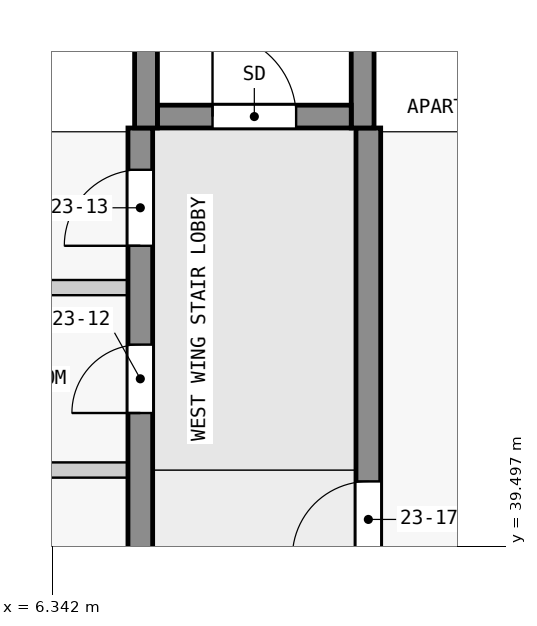
"""IFC4 building model, lengths in metres.
Left out: names, types, materials, properties, quantities, classifications, styles, units other than length and angle.
Written with IfcOpenShell. Run it as: python <this file> out.ifc"""

import sys

from ifc_helpers import new_model, si_unit, direction, frame, frame_2d, origin, place, context, subcontext, project, spatial, rectangle, extrude, element, fill, save


model = new_model("IFC4")
c1 = context("Model", 3, precision=1e-05, world=origin(), true_north=direction((0.0, 1.0)))
c2 = subcontext(c1, "Body", "Model", "MODEL_VIEW")
j1 = project(units=[si_unit("LENGTHUNIT", "METRE"), si_unit("PLANEANGLEUNIT", "RADIAN")], contexts=[c1])
p1 = place(None, origin())
s1 = spatial("IfcSite", under=j1, at=p1, CompositionType="ELEMENT")
p2 = place(p1, origin())
s2 = spatial("IfcBuilding", under=s1, at=p2, CompositionType="ELEMENT")
p3 = place(p2, frame((0.0, 0.0, 92.3)))
s3 = spatial("IfcBuildingStorey", under=s2, at=p3, CompositionType="ELEMENT", Elevation=92.3)
p4 = place(p3, frame((7.725, 45.15, 0.0), z_axis=(0.0, 0.0, 1.0), x_axis=(1.0, 0.0, 0.0)))
e1 = element("IfcWall", 1, at=p4, inside=s3, PredefinedType="SHEAR", context=c2, shape_type="SweptSolid", body=[
    extrude(rectangle(XDim=2.55, YDim=0.3, at=frame_2d((1.275, 0.0))), origin(), (0.0, 0.0, 1.0), 3.5),
])
p5 = place(p4, frame((0.725, 0.0, 0.0)))
e2 = element("IfcOpeningElement", 2, at=p5, cuts=e1, PredefinedType="OPENING", context=c2, shape_type="SweptSolid", body=[
    extrude(rectangle(XDim=1.1, YDim=2.1, at=frame_2d((0.55, 1.05))), frame((0.0, 0.16, 0.0), z_axis=(0.0, -1.0, 0.0), x_axis=(1.0, 0.0, 0.0)), (0.0, 0.0, 1.0), 0.32),
])
for number, where, z_axis, x_axis in (
    (3, (7.575, 45.0, 0.0), (0.0, 0.0, 1.0), (0.0, 1.0, 0.0)),
    (4, (10.425, 45.0, 0.0), (0.0, 0.0, 1.0), (0.0, 1.0, 0.0)),
):
    element("IfcWall", number, at=place(p3, frame(where, z_axis=z_axis, x_axis=x_axis)), inside=s3, PredefinedType="SHEAR", context=c2, shape_type="SweptSolid", body=[
        extrude(rectangle(XDim=7.2, YDim=0.3, at=frame_2d((3.6, 0.0))), origin(), (0.0, 0.0, 1.0), 3.5),
    ])
p6 = place(p3, frame((7.5, 18.0, 0.0), z_axis=(0.0, 0.0, 1.0), x_axis=(0.0, 1.0, 0.0)))
e5 = element("IfcWall", 5, at=p6, inside=s3, PredefinedType="SHEAR", context=c2, shape_type="SweptSolid", body=[
    extrude(rectangle(XDim=27.0, YDim=0.325, at=frame_2d((13.5, 0.0))), origin(), (0.0, 0.0, 1.0), 3.25),
])
p7 = place(p6, frame((1.75, 0.0, 0.0)))
e6 = element("IfcOpeningElement", 6, at=p7, cuts=e5, PredefinedType="OPENING", context=c2, shape_type="SweptSolid", body=[
    extrude(rectangle(XDim=1.0, YDim=2.1, at=frame_2d((0.5, 1.05))), frame((0.0, 0.172, 0.0), z_axis=(0.0, -1.0, 0.0), x_axis=(1.0, 0.0, 0.0)), (0.0, 0.0, 1.0), 0.345),
])
p8 = place(p6, frame((6.25, 0.0, 0.0)))
e7 = element("IfcOpeningElement", 7, at=p8, cuts=e5, PredefinedType="OPENING", context=c2, shape_type="SweptSolid", body=[
    extrude(rectangle(XDim=1.0, YDim=2.1, at=frame_2d((0.5, 1.05))), frame((0.0, 0.172, 0.0), z_axis=(0.0, -1.0, 0.0), x_axis=(1.0, 0.0, 0.0)), (0.0, 0.0, 1.0), 0.345),
])
p9 = place(p6, frame((10.85, 0.0, 0.0)))
e8 = element("IfcOpeningElement", 8, at=p9, cuts=e5, PredefinedType="OPENING", context=c2, shape_type="SweptSolid", body=[
    extrude(rectangle(XDim=0.9, YDim=2.1, at=frame_2d((0.45, 1.05))), frame((0.0, 0.172, 0.0), z_axis=(0.0, -1.0, 0.0), x_axis=(1.0, 0.0, 0.0)), (0.0, 0.0, 1.0), 0.345),
])
p10 = place(p6, frame((15.25, 0.0, 0.0)))
e9 = element("IfcOpeningElement", 9, at=p10, cuts=e5, PredefinedType="OPENING", context=c2, shape_type="SweptSolid", body=[
    extrude(rectangle(XDim=1.0, YDim=2.1, at=frame_2d((0.5, 1.05))), frame((0.0, 0.172, 0.0), z_axis=(0.0, -1.0, 0.0), x_axis=(1.0, 0.0, 0.0)), (0.0, 0.0, 1.0), 0.345),
])
p11 = place(p6, frame((19.85, 0.0, 0.0)))
e10 = element("IfcOpeningElement", 10, at=p11, cuts=e5, PredefinedType="OPENING", context=c2, shape_type="SweptSolid", body=[
    extrude(rectangle(XDim=0.9, YDim=2.1, at=frame_2d((0.45, 1.05))), frame((0.0, 0.172, 0.0), z_axis=(0.0, -1.0, 0.0), x_axis=(1.0, 0.0, 0.0)), (0.0, 0.0, 1.0), 0.345),
])
p12 = place(p6, frame((23.25, 0.0, 0.0)))
e11 = element("IfcOpeningElement", 11, at=p12, cuts=e5, PredefinedType="OPENING", context=c2, shape_type="SweptSolid", body=[
    extrude(rectangle(XDim=0.9, YDim=2.1, at=frame_2d((0.45, 1.05))), frame((0.0, 0.172, 0.0), z_axis=(0.0, -1.0, 0.0), x_axis=(1.0, 0.0, 0.0)), (0.0, 0.0, 1.0), 0.345),
])
p13 = place(p6, frame((25.45, 0.0, 0.0)))
e12 = element("IfcOpeningElement", 12, at=p13, cuts=e5, PredefinedType="OPENING", context=c2, shape_type="SweptSolid", body=[
    extrude(rectangle(XDim=1.0, YDim=2.1, at=frame_2d((0.5, 1.05))), frame((0.0, 0.172, 0.0), z_axis=(0.0, -1.0, 0.0), x_axis=(1.0, 0.0, 0.0)), (0.0, 0.0, 1.0), 0.345),
])
p14 = place(p3, frame((10.5, 18.0, 0.0), z_axis=(0.0, 0.0, 1.0), x_axis=(0.0, 1.0, 0.0)))
e13 = element("IfcWall", 13, at=p14, inside=s3, PredefinedType="SHEAR", context=c2, shape_type="SweptSolid", body=[
    extrude(rectangle(XDim=27.0, YDim=0.325, at=frame_2d((13.5, 0.0))), origin(), (0.0, 0.0, 1.0), 3.25),
])
p15 = place(p14, frame((1.75, 0.0, 0.0)))
e14 = element("IfcOpeningElement", 14, at=p15, cuts=e13, PredefinedType="OPENING", context=c2, shape_type="SweptSolid", body=[
    extrude(rectangle(XDim=1.0, YDim=2.1, at=frame_2d((0.5, 1.05))), frame((0.0, 0.172, 0.0), z_axis=(0.0, -1.0, 0.0), x_axis=(1.0, 0.0, 0.0)), (0.0, 0.0, 1.0), 0.345),
])
p16 = place(p14, frame((6.25, 0.0, 0.0)))
e15 = element("IfcOpeningElement", 15, at=p16, cuts=e13, PredefinedType="OPENING", context=c2, shape_type="SweptSolid", body=[
    extrude(rectangle(XDim=1.0, YDim=2.1, at=frame_2d((0.5, 1.05))), frame((0.0, 0.172, 0.0), z_axis=(0.0, -1.0, 0.0), x_axis=(1.0, 0.0, 0.0)), (0.0, 0.0, 1.0), 0.345),
])
p17 = place(p14, frame((13.05, 0.0, 0.0)))
e16 = element("IfcOpeningElement", 16, at=p17, cuts=e13, PredefinedType="OPENING", context=c2, shape_type="SweptSolid", body=[
    extrude(rectangle(XDim=1.0, YDim=2.1, at=frame_2d((0.5, 1.05))), frame((0.0, 0.172, 0.0), z_axis=(0.0, -1.0, 0.0), x_axis=(1.0, 0.0, 0.0)), (0.0, 0.0, 1.0), 0.345),
])
p18 = place(p14, frame((21.35, 0.0, 0.0)))
e17 = element("IfcOpeningElement", 17, at=p18, cuts=e13, PredefinedType="OPENING", context=c2, shape_type="SweptSolid", body=[
    extrude(rectangle(XDim=1.0, YDim=2.1, at=frame_2d((0.5, 1.05))), frame((0.0, 0.172, 0.0), z_axis=(0.0, -1.0, 0.0), x_axis=(1.0, 0.0, 0.0)), (0.0, 0.0, 1.0), 0.345),
])
p19 = place(p3, frame((7.337, 40.5, 0.0), z_axis=(0.0, 0.0, 1.0), x_axis=(-1.0, 0.0, 0.0)))
e18 = element("IfcWall", 18, at=p19, inside=s3, PredefinedType="PARTITIONING", context=c2, shape_type="SweptSolid", body=[
    extrude(rectangle(XDim=7.417, YDim=0.2, at=frame_2d((3.709, 0.0))), origin(), (0.0, 0.0, 1.0), 3.25),
])
p20 = place(p3, frame((7.337, 42.9, 0.0), z_axis=(0.0, 0.0, 1.0), x_axis=(-1.0, 0.0, 0.0)))
e19 = element("IfcWall", 19, at=p20, inside=s3, PredefinedType="PARTITIONING", context=c2, shape_type="SweptSolid", body=[
    extrude(rectangle(XDim=3.4, YDim=0.2, at=frame_2d((1.7, 0.0))), origin(), (0.0, 0.0, 1.0), 3.25),
])
p21 = place(p5, origin())
e20 = element("IfcDoor", 20, at=p21, inside=s3, OperationType="SINGLE_SWING_LEFT", PredefinedType="DOOR", context=c2, shape_type="SweptSolid", body=[
    extrude(rectangle(XDim=1.1, YDim=2.1, at=frame_2d((0.55, 1.05))), frame((0.0, 0.025, 0.0), z_axis=(0.0, -1.0, 0.0), x_axis=(1.0, 0.0, 0.0)), (0.0, 0.0, 1.0), 0.05),
])
fill(e2, e20)
p22 = place(p12, origin())
e21 = element("IfcDoor", 21, at=p22, inside=s3, OperationType="SINGLE_SWING_RIGHT", PredefinedType="DOOR", context=c2, shape_type="SweptSolid", body=[
    extrude(rectangle(XDim=0.9, YDim=2.1, at=frame_2d((0.45, 1.05))), frame((0.0, 0.025, 0.0), z_axis=(0.0, -1.0, 0.0), x_axis=(1.0, 0.0, 0.0)), (0.0, 0.0, 1.0), 0.05),
])
fill(e11, e21)
p23 = place(p13, origin())
e22 = element("IfcDoor", 22, at=p23, inside=s3, OperationType="SINGLE_SWING_RIGHT", PredefinedType="DOOR", context=c2, shape_type="SweptSolid", body=[
    extrude(rectangle(XDim=1.0, YDim=2.1, at=frame_2d((0.5, 1.05))), frame((0.0, 0.025, 0.0), z_axis=(0.0, -1.0, 0.0), x_axis=(1.0, 0.0, 0.0)), (0.0, 0.0, 1.0), 0.05),
])
fill(e12, e22)
p24 = place(p18, origin())
e23 = element("IfcDoor", 23, at=p24, inside=s3, OperationType="SINGLE_SWING_RIGHT", PredefinedType="DOOR", context=c2, shape_type="SweptSolid", body=[
    extrude(rectangle(XDim=1.0, YDim=2.1, at=frame_2d((0.5, 1.05))), frame((0.0, 0.025, 0.0), z_axis=(0.0, -1.0, 0.0), x_axis=(1.0, 0.0, 0.0)), (0.0, 0.0, 1.0), 0.05),
])
fill(e17, e23)
save(model, sys.argv[1])
